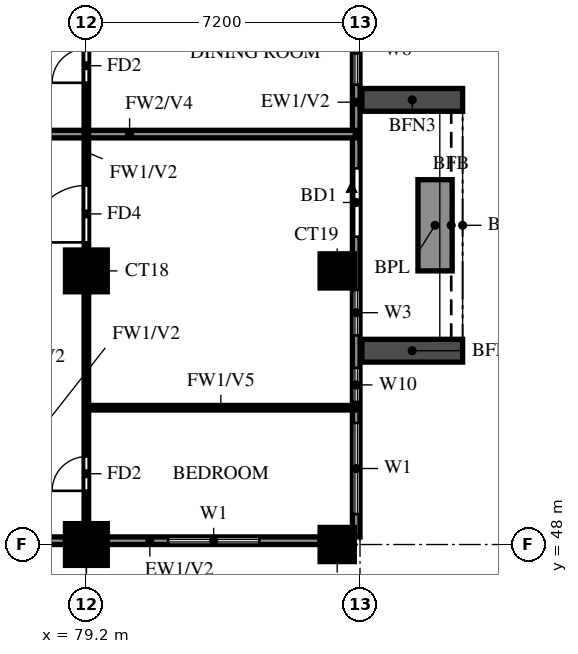
"""IFC4 building model, lengths in metres.
Left out: names, types, materials, properties, quantities, classifications, styles, units other than length and angle.
Written with IfcOpenShell. Run it as: python <this file> out.ifc"""

import sys

from ifc_helpers import new_model, si_unit, direction, frame, frame_2d, origin, origin_2d, place, context, subcontext, project, spatial, rectangle, extrude, source, transform, mapped, element, fill, save


model = new_model("IFC4")
c1 = context("Model", 3, precision=1e-05, world=origin(), true_north=direction((0.0, 1.0)))
c2 = subcontext(c1, "Body", "Model", "MODEL_VIEW")
j1 = project(units=[si_unit("LENGTHUNIT", "METRE"), si_unit("PLANEANGLEUNIT", "RADIAN")], contexts=[c1])
p1 = place(None, origin())
s1 = spatial("IfcSite", under=j1, at=p1, CompositionType="ELEMENT")
p2 = place(p1, origin())
s2 = spatial("IfcBuilding", under=s1, at=p2, CompositionType="ELEMENT")
p3 = place(p2, frame((0.0, 0.0, 120.0)))
s3 = spatial("IfcBuildingStorey", under=s2, at=p3, CompositionType="ELEMENT", Elevation=120.0)
m1 = source(origin(), c2, "Body", "SweptSolid", [
    extrude(rectangle(XDim=1.1, YDim=1.1, at=origin_2d()), origin(), (0.0, 0.0, 1.0), 3.2),
])
p4 = place(p3, frame((79.2, 48.0, 0.0), z_axis=(0.0, 0.0, 1.0), x_axis=(1.0, 0.0, 0.0)))
e1 = element("IfcColumn", 1, at=p4, inside=s3, PredefinedType="COLUMN", context=c2, shape_type="MappedRepresentation", body=[
    mapped(m1, transform((0.0, 0.0, 0.0))),
])
m2 = source(origin(), c2, "Body", "SweptSolid", [
    extrude(rectangle(XDim=0.9, YDim=0.9, at=origin_2d()), origin(), (0.0, 0.0, 1.0), 3.2),
])
p5 = place(p3, frame((85.8, 48.0, 0.0), z_axis=(0.0, 0.0, 1.0), x_axis=(1.0, 0.0, 0.0)))
e2 = element("IfcColumn", 2, at=p5, inside=s3, PredefinedType="COLUMN", context=c2, shape_type="MappedRepresentation", body=[
    mapped(m2, transform((0.0, 0.0, 0.0))),
])
p6 = place(p3, frame((79.2, 55.2, 0.0), z_axis=(0.0, 0.0, 1.0), x_axis=(1.0, 0.0, 0.0)))
e3 = element("IfcColumn", 3, at=p6, inside=s3, PredefinedType="COLUMN", context=c2, shape_type="MappedRepresentation", body=[
    mapped(m1, transform((0.0, 0.0, 0.0))),
])
p7 = place(p3, frame((85.8, 55.2, 0.0), z_axis=(0.0, 0.0, 1.0), x_axis=(1.0, 0.0, 0.0)))
e4 = element("IfcColumn", 4, at=p7, inside=s3, PredefinedType="COLUMN", context=c2, shape_type="MappedRepresentation", body=[
    mapped(m2, transform((0.0, 0.0, 0.0))),
])
p8 = place(p3, frame((85.719, 39.881, 0.0), z_axis=(0.0, 0.0, 1.0), x_axis=(-0.86377618652, 0.503875678716, 0.0)))
e5 = element("IfcWall", 5, at=p8, inside=s3, PredefinedType="SOLIDWALL", context=c2, shape_type="SweptSolid", body=[
    extrude(rectangle(XDim=16.311, YDim=0.2, at=frame_2d((8.156, 0.0))), origin(), (0.0, 0.0, 1.0), 3.2),
])
p9 = place(p8, frame((13.326, 0.0, 1.5)))
e6 = element("IfcOpeningElement", 6, at=p9, cuts=e5, PredefinedType="OPENING", context=c2, shape_type="SweptSolid", body=[
    extrude(rectangle(XDim=0.9, YDim=0.9, at=frame_2d((0.45, 0.45))), frame((0.0, 0.11, 0.0), z_axis=(0.0, -1.0, 0.0), x_axis=(1.0, 0.0, 0.0)), (0.0, 0.0, 1.0), 0.22),
])
p10 = place(p3, frame((71.99, 48.1, 0.0), z_axis=(0.0, 0.0, 1.0), x_axis=(1.0, 0.0, 0.0)))
e7 = element("IfcWall", 7, at=p10, inside=s3, PredefinedType="SOLIDWALL", context=c2, shape_type="SweptSolid", body=[
    extrude(rectangle(XDim=6.66, YDim=0.2, at=frame_2d((3.33, 0.0))), origin(), (0.0, 0.0, 1.0), 3.2),
])
p11 = place(p10, frame((2.205, 0.0, 1.5)))
e8 = element("IfcOpeningElement", 8, at=p11, cuts=e7, PredefinedType="OPENING", context=c2, shape_type="SweptSolid", body=[
    extrude(rectangle(XDim=0.9, YDim=0.9, at=frame_2d((0.45, 0.45))), frame((0.0, 0.11, 0.0), z_axis=(0.0, -1.0, 0.0), x_axis=(1.0, 0.0, 0.0)), (0.0, 0.0, 1.0), 0.22),
])
p12 = place(p3, frame((79.75, 48.1, 0.0), z_axis=(0.0, 0.0, 1.0), x_axis=(1.0, 0.0, 0.0)))
e9 = element("IfcWall", 9, at=p12, inside=s3, PredefinedType="SOLIDWALL", context=c2, shape_type="SweptSolid", body=[
    extrude(rectangle(XDim=5.6, YDim=0.2, at=frame_2d((2.8, 0.0))), origin(), (0.0, 0.0, 1.0), 3.2),
])
p13 = place(p12, frame((1.6, 0.0, 0.6)))
e10 = element("IfcOpeningElement", 10, at=p13, cuts=e9, PredefinedType="OPENING", context=c2, shape_type="SweptSolid", body=[
    extrude(rectangle(XDim=2.4, YDim=2.4, at=frame_2d((1.2, 1.2))), frame((0.0, 0.11, 0.0), z_axis=(0.0, -1.0, 0.0), x_axis=(1.0, 0.0, 0.0)), (0.0, 0.0, 1.0), 0.22),
])
p14 = place(p3, frame((86.3, 48.2, 0.0), z_axis=(0.0, 0.0, 1.0), x_axis=(0.0, 1.0, 0.0)))
e11 = element("IfcWall", 11, at=p14, inside=s3, PredefinedType="SOLIDWALL", context=c2, shape_type="SweptSolid", body=[
    extrude(rectangle(XDim=28.6, YDim=0.2, at=frame_2d((14.3, 0.0))), origin(), (0.0, 0.0, 1.0), 3.2),
])
p15 = place(p14, frame((7.9, 0.0, 0.0)))
e12 = element("IfcOpeningElement", 12, at=p15, cuts=e11, PredefinedType="OPENING", context=c2, shape_type="SweptSolid", body=[
    extrude(rectangle(XDim=1.8, YDim=2.4, at=frame_2d((0.9, 1.2))), frame((0.0, 0.11, 0.0), z_axis=(0.0, -1.0, 0.0), x_axis=(1.0, 0.0, 0.0)), (0.0, 0.0, 1.0), 0.22),
])
p16 = place(p14, frame((0.6, 0.0, 0.6)))
e13 = element("IfcOpeningElement", 13, at=p16, cuts=e11, PredefinedType="OPENING", context=c2, shape_type="SweptSolid", body=[
    extrude(rectangle(XDim=2.4, YDim=2.4, at=frame_2d((1.2, 1.2))), frame((0.0, 0.11, 0.0), z_axis=(0.0, -1.0, 0.0), x_axis=(1.0, 0.0, 0.0)), (0.0, 0.0, 1.0), 0.22),
])
p17 = place(p14, frame((3.55, 0.0, 0.6)))
e14 = element("IfcOpeningElement", 14, at=p17, cuts=e11, PredefinedType="OPENING", context=c2, shape_type="SweptSolid", body=[
    extrude(rectangle(XDim=0.9, YDim=2.4, at=frame_2d((0.45, 1.2))), frame((0.0, 0.11, 0.0), z_axis=(0.0, -1.0, 0.0), x_axis=(1.0, 0.0, 0.0)), (0.0, 0.0, 1.0), 0.22),
])
p18 = place(p14, frame((5.3, 0.0, 0.6)))
e15 = element("IfcOpeningElement", 15, at=p18, cuts=e11, PredefinedType="OPENING", context=c2, shape_type="SweptSolid", body=[
    extrude(rectangle(XDim=1.2, YDim=2.4, at=frame_2d((0.6, 1.2))), frame((0.0, 0.11, 0.0), z_axis=(0.0, -1.0, 0.0), x_axis=(1.0, 0.0, 0.0)), (0.0, 0.0, 1.0), 0.22),
])
p19 = place(p14, frame((11.9, 0.0, 0.6)))
e16 = element("IfcOpeningElement", 16, at=p19, cuts=e11, PredefinedType="OPENING", context=c2, shape_type="SweptSolid", body=[
    extrude(rectangle(XDim=1.8, YDim=2.4, at=frame_2d((0.9, 1.2))), frame((0.0, 0.11, 0.0), z_axis=(0.0, -1.0, 0.0), x_axis=(1.0, 0.0, 0.0)), (0.0, 0.0, 1.0), 0.22),
])
p20 = place(p14, frame((15.167, 0.0, 0.6)))
e17 = element("IfcOpeningElement", 17, at=p20, cuts=e11, PredefinedType="OPENING", context=c2, shape_type="SweptSolid", body=[
    extrude(rectangle(XDim=2.4, YDim=2.4, at=frame_2d((1.2, 1.2))), frame((0.0, 0.11, 0.0), z_axis=(0.0, -1.0, 0.0), x_axis=(1.0, 0.0, 0.0)), (0.0, 0.0, 1.0), 0.22),
])
p21 = place(p14, frame((18.033, 0.0, 0.6)))
e18 = element("IfcOpeningElement", 18, at=p21, cuts=e11, PredefinedType="OPENING", context=c2, shape_type="SweptSolid", body=[
    extrude(rectangle(XDim=2.4, YDim=2.4, at=frame_2d((1.2, 1.2))), frame((0.0, 0.11, 0.0), z_axis=(0.0, -1.0, 0.0), x_axis=(1.0, 0.0, 0.0)), (0.0, 0.0, 1.0), 0.22),
])
p22 = place(p14, frame((22.95, 0.0, 1.5)))
e19 = element("IfcOpeningElement", 19, at=p22, cuts=e11, PredefinedType="OPENING", context=c2, shape_type="SweptSolid", body=[
    extrude(rectangle(XDim=0.9, YDim=0.9, at=frame_2d((0.45, 0.45))), frame((0.0, 0.11, 0.0), z_axis=(0.0, -1.0, 0.0), x_axis=(1.0, 0.0, 0.0)), (0.0, 0.0, 1.0), 0.22),
])
p23 = place(p14, frame((25.4, 0.0, 0.6)))
e20 = element("IfcOpeningElement", 20, at=p23, cuts=e11, PredefinedType="OPENING", context=c2, shape_type="SweptSolid", body=[
    extrude(rectangle(XDim=2.4, YDim=2.4, at=frame_2d((1.2, 1.2))), frame((0.0, 0.11, 0.0), z_axis=(0.0, -1.0, 0.0), x_axis=(1.0, 0.0, 0.0)), (0.0, 0.0, 1.0), 0.22),
])
for number, where, z_axis, x_axis in (
    (21, (86.45, 53.1, 0.0), (0.0, 0.0, 1.0), (1.0, 0.0, 0.0)),
    (22, (86.45, 59.7, 0.0), (0.0, 0.0, 1.0), (1.0, 0.0, 0.0)),
):
    element("IfcWall", number, at=place(p3, frame(where, z_axis=z_axis, x_axis=x_axis)), inside=s3, PredefinedType="SOLIDWALL", context=c2, shape_type="SweptSolid", body=[
        extrude(rectangle(XDim=2.65, YDim=0.6, at=frame_2d((1.325, 0.0))), origin(), (0.0, 0.0, 1.0), 2.85),
    ])
p24 = place(p3, frame((88.375, 55.2, 0.0), z_axis=(0.0, 0.0, 1.0), x_axis=(0.0, 1.0, 0.0)))
e23 = element("IfcWall", 23, at=p24, inside=s3, PredefinedType="SOLIDWALL", context=c2, shape_type="SweptSolid", body=[
    extrude(rectangle(XDim=2.4, YDim=0.9, at=frame_2d((1.2, 0.0))), origin(), (0.0, 0.0, 1.0), 0.9),
])
p25 = place(p3, frame((74.4, 58.8, 0.0), z_axis=(0.0, 0.0, 1.0), x_axis=(1.0, 0.0, 0.0)))
e24 = element("IfcWall", 24, at=p25, inside=s3, PredefinedType="SOLIDWALL", context=c2, shape_type="SweptSolid", body=[
    extrude(rectangle(XDim=11.875, YDim=0.2, at=frame_2d((5.938, 0.0))), origin(), (0.0, 0.0, 1.0), 2.3),
])
p26 = place(p3, frame((79.2, 51.6, 0.0), z_axis=(0.0, 0.0, 1.0), x_axis=(1.0, 0.0, 0.0)))
e25 = element("IfcWall", 25, at=p26, inside=s3, PredefinedType="PARTITIONING", context=c2, shape_type="SweptSolid", body=[
    extrude(rectangle(XDim=7.075, YDim=0.12, at=frame_2d((3.538, 0.0))), origin(), (0.0, 0.0, 1.0), 2.3),
])
p27 = place(p3, frame((79.2, 48.125, 0.0), z_axis=(0.0, 0.0, 1.0), x_axis=(0.0, 1.0, 0.0)))
e26 = element("IfcWall", 26, at=p27, inside=s3, PredefinedType="PARTITIONING", context=c2, shape_type="SweptSolid", body=[
    extrude(rectangle(XDim=21.475, YDim=0.12, at=frame_2d((10.738, 0.0))), origin(), (0.0, 0.0, 1.0), 3.2),
])
p28 = place(p27, frame((1.288, 0.0, 0.0)))
e27 = element("IfcOpeningElement", 27, at=p28, cuts=e26, PredefinedType="OPENING", context=c2, shape_type="SweptSolid", body=[
    extrude(rectangle(XDim=0.9, YDim=2.1, at=frame_2d((0.45, 1.05))), frame((0.0, 0.07, 0.0), z_axis=(0.0, -1.0, 0.0), x_axis=(1.0, 0.0, 0.0)), (0.0, 0.0, 1.0), 0.14),
])
p29 = place(p27, frame((7.825, 0.0, 0.0)))
e28 = element("IfcOpeningElement", 28, at=p29, cuts=e26, PredefinedType="OPENING", context=c2, shape_type="SweptSolid", body=[
    extrude(rectangle(XDim=1.5, YDim=2.1, at=frame_2d((0.75, 1.05))), frame((0.0, 0.07, 0.0), z_axis=(0.0, -1.0, 0.0), x_axis=(1.0, 0.0, 0.0)), (0.0, 0.0, 1.0), 0.14),
])
p30 = place(p27, frame((12.025, 0.0, 0.0)))
e29 = element("IfcOpeningElement", 29, at=p30, cuts=e26, PredefinedType="OPENING", context=c2, shape_type="SweptSolid", body=[
    extrude(rectangle(XDim=0.9, YDim=2.1, at=frame_2d((0.45, 1.05))), frame((0.0, 0.07, 0.0), z_axis=(0.0, -1.0, 0.0), x_axis=(1.0, 0.0, 0.0)), (0.0, 0.0, 1.0), 0.14),
])
p31 = place(p27, frame((17.425, 0.0, 0.0)))
e30 = element("IfcOpeningElement", 30, at=p31, cuts=e26, PredefinedType="OPENING", context=c2, shape_type="SweptSolid", body=[
    extrude(rectangle(XDim=0.9, YDim=2.1, at=frame_2d((0.45, 1.05))), frame((0.0, 0.07, 0.0), z_axis=(0.0, -1.0, 0.0), x_axis=(1.0, 0.0, 0.0)), (0.0, 0.0, 1.0), 0.14),
])
p32 = place(p13, origin())
e31 = element("IfcWindow", 31, at=p32, inside=s3, PartitioningType="DOUBLE_PANEL_VERTICAL", PredefinedType="WINDOW", context=c2, shape_type="SweptSolid", body=[
    extrude(rectangle(XDim=2.4, YDim=2.4, at=frame_2d((1.2, 1.2))), frame((0.0, 0.03, 0.0), z_axis=(0.0, -1.0, 0.0), x_axis=(1.0, 0.0, 0.0)), (0.0, 0.0, 1.0), 0.06),
])
fill(e10, e31)
p33 = place(p15, origin())
e32 = element("IfcDoor", 32, at=p33, inside=s3, OperationType="DOUBLE_DOOR_SLIDING", PredefinedType="DOOR", context=c2, shape_type="SweptSolid", body=[
    extrude(rectangle(XDim=1.8, YDim=2.4, at=frame_2d((0.9, 1.2))), frame((0.0, 0.025, 0.0), z_axis=(0.0, -1.0, 0.0), x_axis=(1.0, 0.0, 0.0)), (0.0, 0.0, 1.0), 0.05),
])
fill(e12, e32)
p34 = place(p16, origin())
e33 = element("IfcWindow", 33, at=p34, inside=s3, PartitioningType="DOUBLE_PANEL_VERTICAL", PredefinedType="WINDOW", context=c2, shape_type="SweptSolid", body=[
    extrude(rectangle(XDim=2.4, YDim=2.4, at=frame_2d((1.2, 1.2))), frame((0.0, 0.03, 0.0), z_axis=(0.0, -1.0, 0.0), x_axis=(1.0, 0.0, 0.0)), (0.0, 0.0, 1.0), 0.06),
])
fill(e13, e33)
p35 = place(p17, origin())
e34 = element("IfcWindow", 34, at=p35, inside=s3, PartitioningType="SINGLE_PANEL", PredefinedType="WINDOW", context=c2, shape_type="SweptSolid", body=[
    extrude(rectangle(XDim=0.9, YDim=2.4, at=frame_2d((0.45, 1.2))), frame((0.0, 0.03, 0.0), z_axis=(0.0, -1.0, 0.0), x_axis=(1.0, 0.0, 0.0)), (0.0, 0.0, 1.0), 0.06),
])
fill(e14, e34)
p36 = place(p18, origin())
e35 = element("IfcWindow", 35, at=p36, inside=s3, PartitioningType="SINGLE_PANEL", PredefinedType="WINDOW", context=c2, shape_type="SweptSolid", body=[
    extrude(rectangle(XDim=1.2, YDim=2.4, at=frame_2d((0.6, 1.2))), frame((0.0, 0.03, 0.0), z_axis=(0.0, -1.0, 0.0), x_axis=(1.0, 0.0, 0.0)), (0.0, 0.0, 1.0), 0.06),
])
fill(e15, e35)
p37 = place(p19, origin())
e36 = element("IfcWindow", 36, at=p37, inside=s3, PartitioningType="DOUBLE_PANEL_VERTICAL", PredefinedType="WINDOW", context=c2, shape_type="SweptSolid", body=[
    extrude(rectangle(XDim=1.8, YDim=2.4, at=frame_2d((0.9, 1.2))), frame((0.0, 0.03, 0.0), z_axis=(0.0, -1.0, 0.0), x_axis=(1.0, 0.0, 0.0)), (0.0, 0.0, 1.0), 0.06),
])
fill(e16, e36)
p38 = place(p28, origin())
e37 = element("IfcDoor", 37, at=p38, inside=s3, OperationType="SINGLE_SWING_LEFT", PredefinedType="DOOR", context=c2, shape_type="SweptSolid", body=[
    extrude(rectangle(XDim=0.9, YDim=2.1, at=frame_2d((0.45, 1.05))), frame((0.0, 0.025, 0.0), z_axis=(0.0, -1.0, 0.0), x_axis=(1.0, 0.0, 0.0)), (0.0, 0.0, 1.0), 0.05),
])
fill(e27, e37)
p39 = place(p29, origin())
e38 = element("IfcDoor", 38, at=p39, inside=s3, OperationType="SINGLE_SWING_LEFT", PredefinedType="DOOR", context=c2, shape_type="SweptSolid", body=[
    extrude(rectangle(XDim=1.5, YDim=2.1, at=frame_2d((0.75, 1.05))), frame((0.0, 0.025, 0.0), z_axis=(0.0, -1.0, 0.0), x_axis=(1.0, 0.0, 0.0)), (0.0, 0.0, 1.0), 0.05),
])
fill(e28, e38)
p40 = place(p30, origin())
e39 = element("IfcDoor", 39, at=p40, inside=s3, OperationType="SINGLE_SWING_RIGHT", PredefinedType="DOOR", context=c2, shape_type="SweptSolid", body=[
    extrude(rectangle(XDim=0.9, YDim=2.1, at=frame_2d((0.45, 1.05))), frame((0.0, 0.025, 0.0), z_axis=(0.0, -1.0, 0.0), x_axis=(1.0, 0.0, 0.0)), (0.0, 0.0, 1.0), 0.05),
])
fill(e29, e39)
save(model, sys.argv[1])
